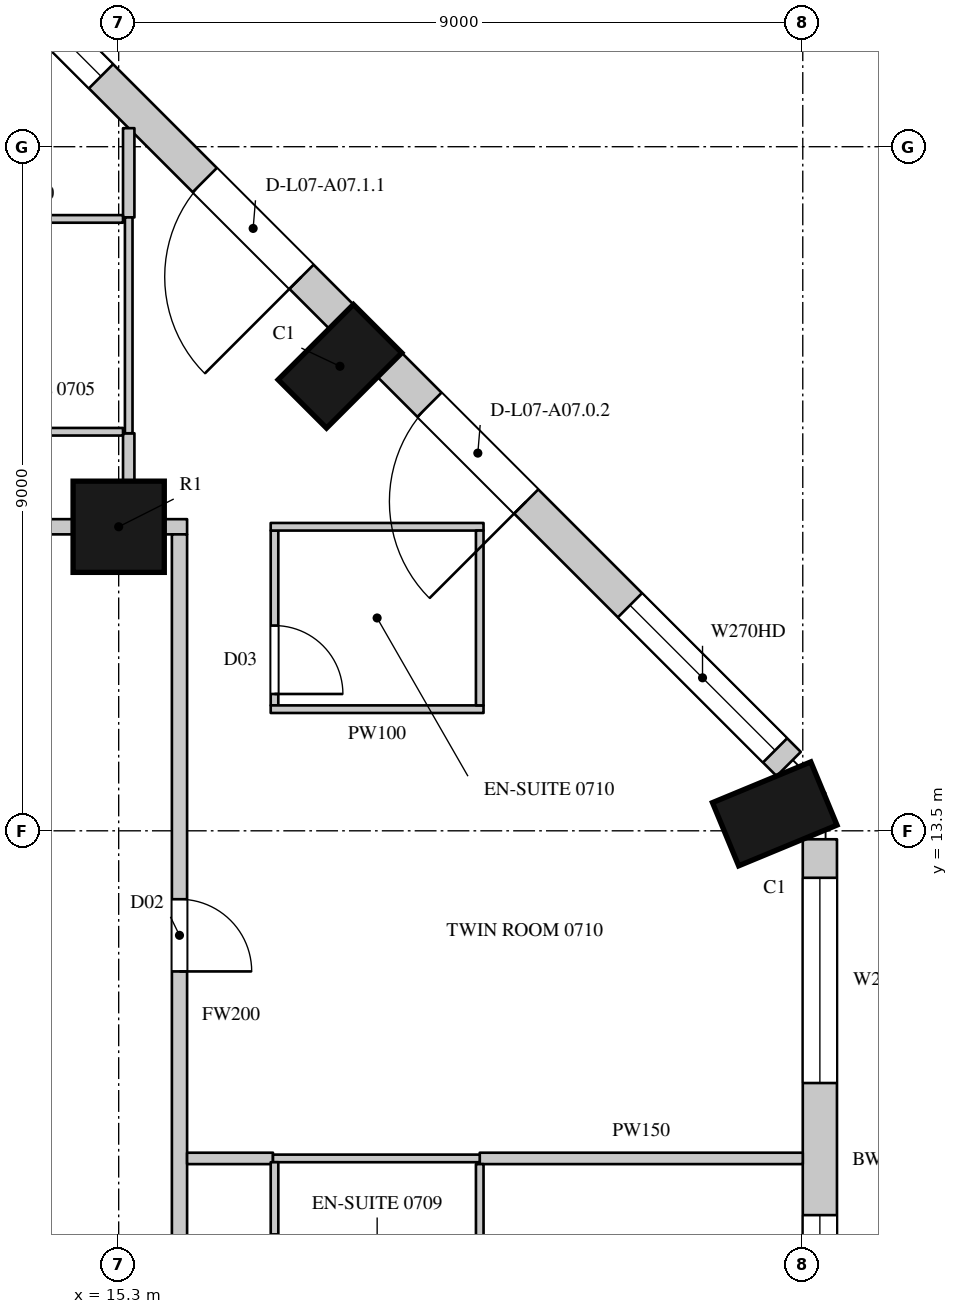
"""IFC4 building model, lengths in metres.
Left out: names, types, materials, properties, quantities, classifications, styles, units other than length and angle.
Written with IfcOpenShell. Run it as: python <this file> out.ifc"""

import sys

from ifc_helpers import new_model, si_unit, direction, frame, frame_2d, origin, origin_2d, place, context, subcontext, project, spatial, rectangle, circle, extrude, element, fill, save


model = new_model("IFC4")
c1 = context("Model", 3, precision=1e-05, world=origin(), true_north=direction((0.0, 1.0)))
c2 = subcontext(c1, "Body", "Model", "MODEL_VIEW")
j1 = project(units=[si_unit("LENGTHUNIT", "METRE"), si_unit("PLANEANGLEUNIT", "RADIAN")], contexts=[c1])
p1 = place(None, origin())
s1 = spatial("IfcSite", under=j1, at=p1, CompositionType="ELEMENT")
p2 = place(p1, origin())
s2 = spatial("IfcBuilding", under=s1, at=p2, CompositionType="ELEMENT")
p3 = place(p2, frame((0.0, 0.0, 55.5)))
s3 = spatial("IfcBuildingStorey", under=s2, at=p3, CompositionType="ELEMENT", Elevation=55.5)
for number, where, z_axis, x_axis in (
    (1, (23.931, 13.723, 0.0), (0.0, 0.0, 1.0), (-0.383, 0.924, 0.0)),
    (2, (18.211, 19.611, 0.0), (0.0, 0.0, 1.0), (-0.707, 0.707, 0.0)),
):
    element("IfcColumn", number, at=place(p3, frame(where, z_axis=z_axis, x_axis=x_axis)), inside=s3, PredefinedType="COLUMN", context=c2, shape_type="SweptSolid", body=[
        extrude(rectangle(XDim=0.9, YDim=1.4, at=origin_2d()), origin(), (0.0, 0.0, 1.0), 3.6),
    ])
p4 = place(p3, frame((15.3, 17.5, 0.0), z_axis=(0.0, 0.0, 1.0), x_axis=(1.0, 0.0, 0.0)))
e3 = element("IfcColumn", 3, at=p4, inside=s3, PredefinedType="COLUMN", context=c2, shape_type="SweptSolid", body=[
    extrude(circle(Radius=0.6, at=origin_2d()), origin(), (0.0, 0.0, 1.0), 3.6),
])
p5 = place(p3, frame((24.525, 4.95, 0.0), z_axis=(0.0, 0.0, 1.0), x_axis=(0.0, 1.0, 0.0)))
e4 = element("IfcWall", 4, at=p5, inside=s3, PredefinedType="SOLIDWALL", context=c2, shape_type="SweptSolid", body=[
    extrude(rectangle(XDim=8.439, YDim=0.45, at=frame_2d((4.219, 0.0))), origin(), (0.0, 0.0, 1.0), 3.3),
])
p6 = place(p5, frame((0.294, 0.0, 0.0)))
e5 = element("IfcOpeningElement", 5, at=p6, cuts=e4, PredefinedType="OPENING", context=c2, shape_type="SweptSolid", body=[
    extrude(rectangle(XDim=1.8, YDim=2.4, at=frame_2d((0.9, 1.2))), frame((0.0, 0.235, 0.0), z_axis=(0.0, -1.0, 0.0), x_axis=(1.0, 0.0, 0.0)), (0.0, 0.0, 1.0), 0.47),
])
p7 = place(p5, frame((2.294, 0.0, 1.05)))
e6 = element("IfcOpeningElement", 6, at=p7, cuts=e4, PredefinedType="OPENING", context=c2, shape_type="SweptSolid", body=[
    extrude(rectangle(XDim=1.2, YDim=2.0, at=frame_2d((0.6, 1.0))), frame((0.0, 0.235, 0.0), z_axis=(0.0, -1.0, 0.0), x_axis=(1.0, 0.0, 0.0)), (0.0, 0.0, 1.0), 0.47),
])
p8 = place(p5, frame((5.232, 0.0, 1.05)))
e7 = element("IfcOpeningElement", 7, at=p8, cuts=e4, PredefinedType="OPENING", context=c2, shape_type="SweptSolid", body=[
    extrude(rectangle(XDim=2.7, YDim=2.0, at=frame_2d((1.35, 1.0))), frame((0.0, 0.235, 0.0), z_axis=(0.0, -1.0, 0.0), x_axis=(1.0, 0.0, 0.0)), (0.0, 0.0, 1.0), 0.47),
])
p9 = place(p3, frame((24.115, 14.379, 0.0), z_axis=(0.0, 0.0, 1.0), x_axis=(-0.707106781187, 0.707106781187, 0.0)))
e8 = element("IfcWall", 8, at=p9, inside=s3, PredefinedType="SOLIDWALL", context=c2, shape_type="SweptSolid", body=[
    extrude(rectangle(XDim=7.424, YDim=0.45, at=frame_2d((3.712, 0.0))), origin(), (0.0, 0.0, 1.0), 3.3),
])
p10 = place(p9, frame((0.253, 0.0, 1.05)))
e9 = element("IfcOpeningElement", 9, at=p10, cuts=e8, PredefinedType="OPENING", context=c2, shape_type="SweptSolid", body=[
    extrude(rectangle(XDim=2.7, YDim=2.0, at=frame_2d((1.35, 1.0))), frame((0.0, 0.235, 0.0), z_axis=(0.0, -1.0, 0.0), x_axis=(1.0, 0.0, 0.0)), (0.0, 0.0, 1.0), 0.47),
])
p11 = place(p9, frame((4.884, 0.0, 0.0)))
e10 = element("IfcOpeningElement", 10, at=p11, cuts=e8, PredefinedType="OPENING", context=c2, shape_type="SweptSolid", body=[
    extrude(rectangle(XDim=1.8, YDim=2.4, at=frame_2d((0.9, 1.2))), frame((0.0, 0.235, 0.0), z_axis=(0.0, -1.0, 0.0), x_axis=(1.0, 0.0, 0.0)), (0.0, 0.0, 1.0), 0.47),
])
p12 = place(p3, frame((18.229, 20.265, 0.0), z_axis=(0.0, 0.0, 1.0), x_axis=(-0.707106781187, 0.707106781187, 0.0)))
e11 = element("IfcWall", 11, at=p12, inside=s3, PredefinedType="SOLIDWALL", context=c2, shape_type="SweptSolid", body=[
    extrude(rectangle(XDim=7.424, YDim=0.45, at=frame_2d((3.712, 0.0))), origin(), (0.0, 0.0, 1.0), 3.3),
])
p13 = place(p12, frame((0.74, 0.0, 0.0)))
e12 = element("IfcOpeningElement", 12, at=p13, cuts=e11, PredefinedType="OPENING", context=c2, shape_type="SweptSolid", body=[
    extrude(rectangle(XDim=1.8, YDim=2.4, at=frame_2d((0.9, 1.2))), frame((0.0, 0.235, 0.0), z_axis=(0.0, -1.0, 0.0), x_axis=(1.0, 0.0, 0.0)), (0.0, 0.0, 1.0), 0.47),
])
p14 = place(p12, frame((4.471, 0.0, 1.05)))
e13 = element("IfcOpeningElement", 13, at=p14, cuts=e11, PredefinedType="OPENING", context=c2, shape_type="SweptSolid", body=[
    extrude(rectangle(XDim=2.7, YDim=2.0, at=frame_2d((1.35, 1.0))), frame((0.0, 0.235, 0.0), z_axis=(0.0, -1.0, 0.0), x_axis=(1.0, 0.0, 0.0)), (0.0, 0.0, 1.0), 0.47),
])
p15 = place(p3, frame((23.15, 16.864, 0.0), z_axis=(0.0, 0.0, 1.0), x_axis=(-0.707106781187, 0.707106781187, 0.0)))
e14 = element("IfcWall", 14, at=p15, inside=s3, PredefinedType="SOLIDWALL", context=c2, shape_type="SweptSolid", body=[
    extrude(rectangle(XDim=1.445, YDim=0.45, at=frame_2d((0.722, 0.0))), origin(), (0.0, 0.0, 1.0), 0.6),
])
p16 = place(p3, frame((19.937, 20.078, 0.0), z_axis=(0.0, 0.0, 1.0), x_axis=(-0.707106781187, 0.707106781187, 0.0)))
e15 = element("IfcWall", 15, at=p16, inside=s3, PredefinedType="SOLIDWALL", context=c2, shape_type="SweptSolid", body=[
    extrude(rectangle(XDim=1.781, YDim=0.45, at=frame_2d((0.89, 0.0))), origin(), (0.0, 0.0, 1.0), 0.6),
])
p17 = place(p3, frame((16.486, 23.529, 0.0), z_axis=(0.0, 0.0, 1.0), x_axis=(-0.707022305137, 0.707191247145, 0.0)))
e16 = element("IfcWall", 16, at=p17, inside=s3, PredefinedType="SOLIDWALL", context=c2, shape_type="SweptSolid", body=[
    extrude(rectangle(XDim=1.445, YDim=0.45, at=frame_2d((0.723, 0.0))), origin(), (0.0, 0.0, 1.0), 0.6),
])
p18 = place(p3, frame((6.9, 17.5, 0.0), z_axis=(0.0, 0.0, 1.0), x_axis=(1.0, 0.0, 0.0)))
e17 = element("IfcWall", 17, at=p18, inside=s3, PredefinedType="PARTITIONING", context=c2, shape_type="SweptSolid", body=[
    extrude(rectangle(XDim=7.8, YDim=0.2, at=frame_2d((3.9, 0.0))), origin(), (0.0, 0.0, 1.0), 2.75),
])
p19 = place(p18, frame((1.45, 0.0, 0.0)))
e18 = element("IfcOpeningElement", 18, at=p19, cuts=e17, PredefinedType="OPENING", context=c2, shape_type="SweptSolid", body=[
    extrude(rectangle(XDim=1.1, YDim=2.4, at=frame_2d((0.55, 1.2))), frame((0.0, 0.11, 0.0), z_axis=(0.0, -1.0, 0.0), x_axis=(1.0, 0.0, 0.0)), (0.0, 0.0, 1.0), 0.22),
])
p20 = place(p3, frame((15.9, 17.5, 0.0), z_axis=(0.0, 0.0, 1.0), x_axis=(1.0, 0.0, 0.0)))
e19 = element("IfcWall", 19, at=p20, inside=s3, PredefinedType="PARTITIONING", context=c2, shape_type="SweptSolid", body=[
    extrude(rectangle(XDim=0.3, YDim=0.2, at=frame_2d((0.15, 0.0))), origin(), (0.0, 0.0, 1.0), 3.3),
])
p21 = place(p3, frame((16.1, 4.75, 0.0), z_axis=(0.0, 0.0, 1.0), x_axis=(0.0, 1.0, 0.0)))
e20 = element("IfcWall", 20, at=p21, inside=s3, PredefinedType="PARTITIONING", context=c2, shape_type="SweptSolid", body=[
    extrude(rectangle(XDim=12.65, YDim=0.2, at=frame_2d((6.325, 0.0))), origin(), (0.0, 0.0, 1.0), 3.3),
])
p22 = place(p21, frame((0.25, 0.0, 0.0)))
e21 = element("IfcOpeningElement", 21, at=p22, cuts=e20, PredefinedType="OPENING", context=c2, shape_type="SweptSolid", body=[
    extrude(rectangle(XDim=0.95, YDim=2.2, at=frame_2d((0.475, 1.1))), frame((0.0, 0.11, 0.0), z_axis=(0.0, -1.0, 0.0), x_axis=(1.0, 0.0, 0.0)), (0.0, 0.0, 1.0), 0.22),
])
p23 = place(p21, frame((6.9, 0.0, 0.0)))
e22 = element("IfcOpeningElement", 22, at=p23, cuts=e20, PredefinedType="OPENING", context=c2, shape_type="SweptSolid", body=[
    extrude(rectangle(XDim=0.95, YDim=2.2, at=frame_2d((0.475, 1.1))), frame((0.0, 0.11, 0.0), z_axis=(0.0, -1.0, 0.0), x_axis=(1.0, 0.0, 0.0)), (0.0, 0.0, 1.0), 0.22),
])
p24 = place(p3, frame((15.432, 18.094, 0.0), z_axis=(0.0, 0.0, 1.0), x_axis=(0.0, 1.0, 0.0)))
e23 = element("IfcWall", 23, at=p24, inside=s3, PredefinedType="PARTITIONING", context=c2, shape_type="SweptSolid", body=[
    extrude(rectangle(XDim=0.636, YDim=0.15, at=frame_2d((0.318, 0.0))), origin(), (0.0, 0.0, 1.0), 3.3),
])
p25 = place(p3, frame((15.432, 21.57, 0.0), z_axis=(0.0, 0.0, 1.0), x_axis=(0.0, 1.0, 0.0)))
e24 = element("IfcWall", 24, at=p25, inside=s3, PredefinedType="PARTITIONING", context=c2, shape_type="SweptSolid", body=[
    extrude(rectangle(XDim=1.174, YDim=0.15, at=frame_2d((0.587, 0.0))), origin(), (0.0, 0.0, 1.0), 3.3),
])
p26 = place(p3, frame((16.2, 9.19, 0.0), z_axis=(0.0, 0.0, 1.0), x_axis=(1.0, 0.0, 0.0)))
e25 = element("IfcWall", 25, at=p26, inside=s3, PredefinedType="PARTITIONING", context=c2, shape_type="SweptSolid", body=[
    extrude(rectangle(XDim=1.13, YDim=0.15, at=frame_2d((0.565, 0.0))), origin(), (0.0, 0.0, 1.0), 2.65),
])
p27 = place(p3, frame((20.05, 9.19, 0.0), z_axis=(0.0, 0.0, 1.0), x_axis=(1.0, 0.0, 0.0)))
e26 = element("IfcWall", 26, at=p27, inside=s3, PredefinedType="PARTITIONING", context=c2, shape_type="SweptSolid", body=[
    extrude(rectangle(XDim=4.25, YDim=0.15, at=frame_2d((2.125, 0.0))), origin(), (0.0, 0.0, 1.0), 2.65),
])
for number, where, z_axis, x_axis in (
    (27, (12.786, 18.75, 0.0), (0.0, 0.0, 1.0), (1.0, 0.0, 0.0)),
    (28, (12.786, 21.55, 0.0), (0.0, 0.0, 1.0), (1.0, 0.0, 0.0)),
):
    element("IfcWall", number, at=place(p3, frame(where, z_axis=z_axis, x_axis=x_axis)), inside=s3, PredefinedType="PARTITIONING", context=c2, shape_type="SweptSolid", body=[
        extrude(rectangle(XDim=2.571, YDim=0.1, at=frame_2d((1.286, 0.0))), origin(), (0.0, 0.0, 1.0), 3.3),
    ])
p28 = place(p3, frame((15.432, 18.73, 0.0), z_axis=(0.0, 0.0, 1.0), x_axis=(0.0, 1.0, 0.0)))
e29 = element("IfcWall", 29, at=p28, inside=s3, PredefinedType="PARTITIONING", context=c2, shape_type="SweptSolid", body=[
    extrude(rectangle(XDim=2.84, YDim=0.1, at=frame_2d((1.42, 0.0))), origin(), (0.0, 0.0, 1.0), 3.3),
])
p29 = place(p3, frame((17.33, 9.19, 0.0), z_axis=(0.0, 0.0, 1.0), x_axis=(1.0, 0.0, 0.0)))
e30 = element("IfcWall", 30, at=p29, inside=s3, PredefinedType="PARTITIONING", context=c2, shape_type="SweptSolid", body=[
    extrude(rectangle(XDim=2.72, YDim=0.1, at=frame_2d((1.36, 0.0))), origin(), (0.0, 0.0, 1.0), 2.65),
])
p30 = place(p3, frame((17.35, 9.14, 0.0), z_axis=(0.0, 0.0, 1.0), x_axis=(0.000337211244, -0.999999943144, 0.0)))
e31 = element("IfcWall", 31, at=p30, inside=s3, PredefinedType="PARTITIONING", context=c2, shape_type="SweptSolid", body=[
    extrude(rectangle(XDim=2.896, YDim=0.1, at=frame_2d((1.448, 0.0))), origin(), (0.0, 0.0, 1.0), 3.3),
])
p31 = place(p30, frame((0.95, 0.0, 0.0)))
e32 = element("IfcOpeningElement", 32, at=p31, cuts=e31, PredefinedType="OPENING", context=c2, shape_type="SweptSolid", body=[
    extrude(rectangle(XDim=0.9, YDim=2.2, at=frame_2d((0.45, 1.1))), frame((0.0, 0.06, 0.0), z_axis=(0.0, -1.0, 0.0), x_axis=(1.0, 0.0, 0.0)), (0.0, 0.0, 1.0), 0.12),
])
p32 = place(p3, frame((17.35, 15.15, 0.0), z_axis=(0.0, 0.0, 1.0), x_axis=(0.0, 1.0, 0.0)))
e33 = element("IfcWall", 33, at=p32, inside=s3, PredefinedType="PARTITIONING", context=c2, shape_type="SweptSolid", body=[
    extrude(rectangle(XDim=2.3, YDim=0.1, at=frame_2d((1.15, 0.0))), origin(), (0.0, 0.0, 1.0), 3.3),
])
p33 = place(p32, frame((0.15, 0.0, 0.0)))
e34 = element("IfcOpeningElement", 34, at=p33, cuts=e33, PredefinedType="OPENING", context=c2, shape_type="SweptSolid", body=[
    extrude(rectangle(XDim=0.9, YDim=2.2, at=frame_2d((0.45, 1.1))), frame((0.0, 0.06, 0.0), z_axis=(0.0, -1.0, 0.0), x_axis=(1.0, 0.0, 0.0)), (0.0, 0.0, 1.0), 0.12),
])
for number, where, z_axis, x_axis in (
    (35, (17.3, 15.1, 0.0), (0.0, 0.0, 1.0), (1.0, 0.0, 0.0)),
    (36, (17.3, 17.5, 0.0), (0.0, 0.0, 1.0), (1.0, 0.0, 0.0)),
):
    element("IfcWall", number, at=place(p3, frame(where, z_axis=z_axis, x_axis=x_axis)), inside=s3, PredefinedType="PARTITIONING", context=c2, shape_type="SweptSolid", body=[
        extrude(rectangle(XDim=2.8, YDim=0.1, at=frame_2d((1.4, 0.0))), origin(), (0.0, 0.0, 1.0), 3.3),
    ])
p34 = place(p3, frame((20.05, 9.115, 0.0), z_axis=(0.0, 0.0, 1.0), x_axis=(0.000352547131, -0.999999937855, 0.0)))
e37 = element("IfcWall", 37, at=p34, inside=s3, PredefinedType="PARTITIONING", context=c2, shape_type="SweptSolid", body=[
    extrude(rectangle(XDim=2.77, YDim=0.1, at=frame_2d((1.385, 0.0))), origin(), (0.0, 0.0, 1.0), 3.3),
])
p35 = place(p3, frame((20.05, 15.15, 0.0), z_axis=(0.0, 0.0, 1.0), x_axis=(0.0, 1.0, 0.0)))
e38 = element("IfcWall", 38, at=p35, inside=s3, PredefinedType="PARTITIONING", context=c2, shape_type="SweptSolid", body=[
    extrude(rectangle(XDim=2.3, YDim=0.1, at=frame_2d((1.15, 0.0))), origin(), (0.0, 0.0, 1.0), 3.3),
])
p36 = place(p7, origin())
e39 = element("IfcWindow", 39, at=p36, inside=s3, PartitioningType="SINGLE_PANEL", PredefinedType="WINDOW", context=c2, shape_type="SweptSolid", body=[
    extrude(rectangle(XDim=1.2, YDim=2.0, at=frame_2d((0.6, 1.0))), frame((0.0, 0.135, 0.0), z_axis=(0.0, -1.0, 0.0), x_axis=(1.0, 0.0, 0.0)), (0.0, 0.0, 1.0), 0.06),
])
fill(e6, e39)
p37 = place(p8, origin())
e40 = element("IfcWindow", 40, at=p37, inside=s3, PartitioningType="SINGLE_PANEL", PredefinedType="WINDOW", context=c2, shape_type="SweptSolid", body=[
    extrude(rectangle(XDim=2.7, YDim=2.0, at=frame_2d((1.35, 1.0))), frame((0.0, 0.135, 0.0), z_axis=(0.0, -1.0, 0.0), x_axis=(1.0, 0.0, 0.0)), (0.0, 0.0, 1.0), 0.06),
])
fill(e7, e40)
p38 = place(p10, origin())
e41 = element("IfcWindow", 41, at=p38, inside=s3, PartitioningType="SINGLE_PANEL", PredefinedType="WINDOW", context=c2, shape_type="SweptSolid", body=[
    extrude(rectangle(XDim=2.7, YDim=2.0, at=frame_2d((1.35, 1.0))), frame((0.0, 0.135, 0.0), z_axis=(0.0, -1.0, 0.0), x_axis=(1.0, 0.0, 0.0)), (0.0, 0.0, 1.0), 0.06),
])
fill(e9, e41)
p39 = place(p11, origin())
e42 = element("IfcDoor", 42, at=p39, inside=s3, OperationType="SLIDING_TO_LEFT", PredefinedType="DOOR", context=c2, shape_type="SweptSolid", body=[
    extrude(rectangle(XDim=1.8, YDim=2.4, at=frame_2d((0.9, 1.2))), frame((0.0, 0.13, 0.0), z_axis=(0.0, -1.0, 0.0), x_axis=(1.0, 0.0, 0.0)), (0.0, 0.0, 1.0), 0.05),
])
fill(e10, e42)
p40 = place(p13, origin())
e43 = element("IfcDoor", 43, at=p40, inside=s3, OperationType="SLIDING_TO_LEFT", PredefinedType="DOOR", context=c2, shape_type="SweptSolid", body=[
    extrude(rectangle(XDim=1.8, YDim=2.4, at=frame_2d((0.9, 1.2))), frame((0.0, 0.13, 0.0), z_axis=(0.0, -1.0, 0.0), x_axis=(1.0, 0.0, 0.0)), (0.0, 0.0, 1.0), 0.05),
])
fill(e12, e43)
p41 = place(p14, origin())
e44 = element("IfcWindow", 44, at=p41, inside=s3, PartitioningType="SINGLE_PANEL", PredefinedType="WINDOW", context=c2, shape_type="SweptSolid", body=[
    extrude(rectangle(XDim=2.7, YDim=2.0, at=frame_2d((1.35, 1.0))), frame((0.0, 0.135, 0.0), z_axis=(0.0, -1.0, 0.0), x_axis=(1.0, 0.0, 0.0)), (0.0, 0.0, 1.0), 0.06),
])
fill(e13, e44)
p42 = place(p31, origin())
e45 = element("IfcDoor", 45, at=p42, inside=s3, OperationType="SINGLE_SWING_RIGHT", PredefinedType="DOOR", context=c2, shape_type="SweptSolid", body=[
    extrude(rectangle(XDim=0.9, YDim=2.2, at=frame_2d((0.45, 1.1))), frame((0.0, 0.025, 0.0), z_axis=(0.0, -1.0, 0.0), x_axis=(1.0, 0.0, 0.0)), (0.0, 0.0, 1.0), 0.05),
])
fill(e32, e45)
p43 = place(p23, origin())
e46 = element("IfcDoor", 46, at=p43, inside=s3, OperationType="SINGLE_SWING_RIGHT", PredefinedType="DOOR", context=c2, shape_type="SweptSolid", body=[
    extrude(rectangle(XDim=0.95, YDim=2.2, at=frame_2d((0.475, 1.1))), frame((0.0, 0.025, 0.0), z_axis=(0.0, -1.0, 0.0), x_axis=(1.0, 0.0, 0.0)), (0.0, 0.0, 1.0), 0.05),
])
fill(e22, e46)
p44 = place(p33, origin())
e47 = element("IfcDoor", 47, at=p44, inside=s3, OperationType="SINGLE_SWING_RIGHT", PredefinedType="DOOR", context=c2, shape_type="SweptSolid", body=[
    extrude(rectangle(XDim=0.9, YDim=2.2, at=frame_2d((0.45, 1.1))), frame((0.0, 0.025, 0.0), z_axis=(0.0, -1.0, 0.0), x_axis=(1.0, 0.0, 0.0)), (0.0, 0.0, 1.0), 0.05),
])
fill(e34, e47)
save(model, sys.argv[1])
